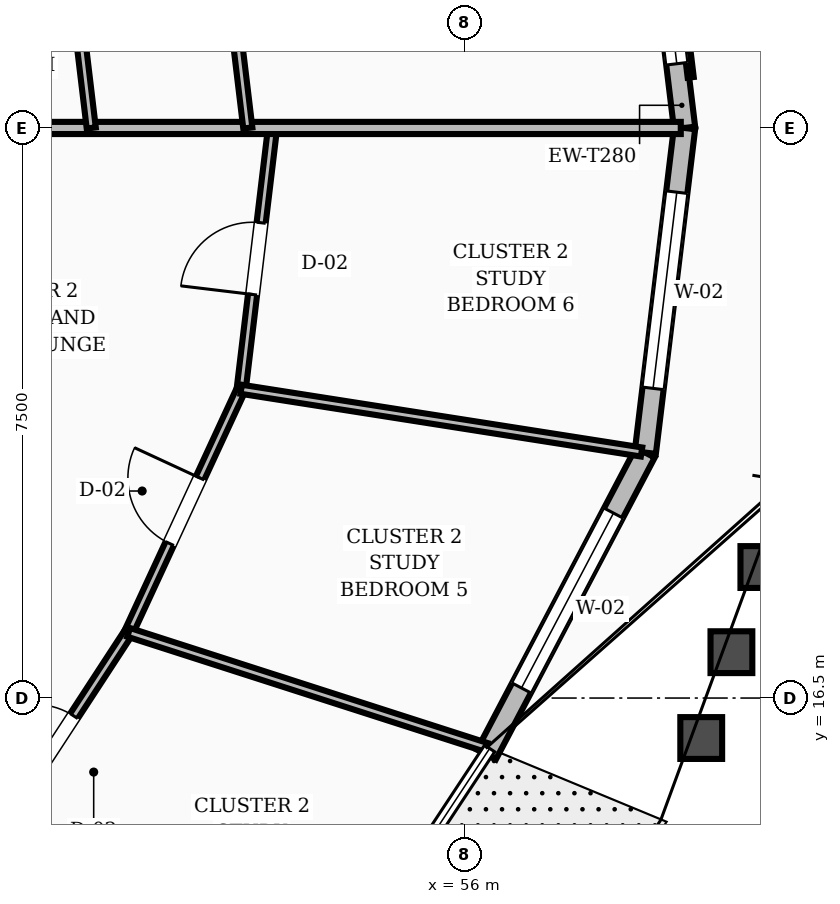
"""IFC4 building model, lengths in metres.
Left out: names, types, materials, properties, quantities, classifications, styles, units other than length and angle.
Written with IfcOpenShell. Run it as: python <this file> out.ifc"""

import sys

from ifc_helpers import new_model, si_unit, direction, frame, frame_2d, origin, place, context, subcontext, project, spatial, rectangle, extrude, element, fill, save


model = new_model("IFC4")
c1 = context("Model", 3, precision=1e-05, world=origin(), true_north=direction((0.0, 1.0)))
c2 = subcontext(c1, "Body", "Model", "MODEL_VIEW")
j1 = project(units=[si_unit("LENGTHUNIT", "METRE"), si_unit("PLANEANGLEUNIT", "RADIAN")], contexts=[c1])
p1 = place(None, origin())
s1 = spatial("IfcSite", under=j1, at=p1, CompositionType="ELEMENT")
p2 = place(p1, origin())
s2 = spatial("IfcBuilding", under=s1, at=p2, CompositionType="ELEMENT")
p3 = place(p2, frame((0.0, 0.0, 66.4)))
s3 = spatial("IfcBuildingStorey", under=s2, at=p3, CompositionType="ELEMENT", Elevation=66.4)
p4 = place(p3, frame((58.892, 24.0, 0.0), z_axis=(0.0, 0.0, 1.0), x_axis=(-0.120143237499, 0.992756567585, 0.0)))
e1 = element("IfcWall", 1, at=p4, inside=s3, PredefinedType="STANDARD", context=c2, shape_type="SweptSolid", body=[
    extrude(rectangle(XDim=4.302, YDim=0.28, at=frame_2d((2.151, 0.0))), origin(), (0.0, 0.0, 1.0), 2.71),
])
p5 = place(p4, frame((0.851, 0.0, 0.8)))
e2 = element("IfcOpeningElement", 2, at=p5, cuts=e1, PredefinedType="OPENING", context=c2, shape_type="SweptSolid", body=[
    extrude(rectangle(XDim=2.6, YDim=1.65, at=frame_2d((1.3, 0.825))), frame((0.0, 0.15, 0.0), z_axis=(0.0, -1.0, 0.0), x_axis=(1.0, 0.0, 0.0)), (0.0, 0.0, 1.0), 0.3),
])
p6 = place(p3, frame((56.284, 15.755, 0.0), z_axis=(0.0, 0.0, 1.0), x_axis=(0.465582838715, 0.88500430524, 0.0)))
e3 = element("IfcWall", 3, at=p6, inside=s3, PredefinedType="STANDARD", context=c2, shape_type="SweptSolid", body=[
    extrude(rectangle(XDim=4.49, YDim=0.28, at=frame_2d((2.245, 0.0))), origin(), (0.0, 0.0, 1.0), 2.71),
])
p7 = place(p6, frame((0.991, 0.0, 0.8)))
e4 = element("IfcOpeningElement", 4, at=p7, cuts=e3, PredefinedType="OPENING", context=c2, shape_type="SweptSolid", body=[
    extrude(rectangle(XDim=2.6, YDim=1.65, at=frame_2d((1.3, 0.825))), frame((0.0, 0.15, 0.0), z_axis=(0.0, -1.0, 0.0), x_axis=(1.0, 0.0, 0.0)), (0.0, 0.0, 1.0), 0.3),
])
p8 = place(p3, frame((58.375, 19.729, 0.0), z_axis=(0.0, 0.0, 1.0), x_axis=(0.120143237499, 0.992756567585, 0.0)))
e5 = element("IfcWall", 5, at=p8, inside=s3, PredefinedType="STANDARD", context=c2, shape_type="SweptSolid", body=[
    extrude(rectangle(XDim=4.302, YDim=0.28, at=frame_2d((2.151, 0.0))), origin(), (0.0, 0.0, 1.0), 2.71),
])
p9 = place(p8, frame((0.851, 0.0, 0.8)))
e6 = element("IfcOpeningElement", 6, at=p9, cuts=e5, PredefinedType="OPENING", context=c2, shape_type="SweptSolid", body=[
    extrude(rectangle(XDim=2.6, YDim=1.65, at=frame_2d((1.3, 0.825))), frame((0.0, 0.15, 0.0), z_axis=(0.0, -1.0, 0.0), x_axis=(1.0, 0.0, 0.0)), (0.0, 0.0, 1.0), 0.3),
])
p10 = place(p3, frame((49.619, 14.366, 0.0), z_axis=(0.0, 0.0, 1.0), x_axis=(0.546856201366, 0.837226549404, 0.0)))
e7 = element("IfcWall", 7, at=p10, inside=s3, PredefinedType="PARTITIONING", context=c2, shape_type="SweptSolid", body=[
    extrude(rectangle(XDim=3.581, YDim=0.12, at=frame_2d((1.791, 0.0))), origin(), (0.0, 0.0, 1.0), 2.71),
])
p11 = place(p10, frame((1.315, 0.0, 0.0)))
e8 = element("IfcOpeningElement", 8, at=p11, cuts=e7, PredefinedType="OPENING", context=c2, shape_type="SweptSolid", body=[
    extrude(rectangle(XDim=0.95, YDim=2.1, at=frame_2d((0.475, 1.05))), frame((0.0, 0.07, 0.0), z_axis=(0.0, -1.0, 0.0), x_axis=(1.0, 0.0, 0.0)), (0.0, 0.0, 1.0), 0.14),
])
p12 = place(p3, frame((51.578, 17.364, 0.0), z_axis=(0.0, 0.0, 1.0), x_axis=(0.420077084971, 0.907488425646, 0.0)))
e9 = element("IfcWall", 9, at=p12, inside=s3, PredefinedType="PARTITIONING", context=c2, shape_type="SweptSolid", body=[
    extrude(rectangle(XDim=3.524, YDim=0.12, at=frame_2d((1.762, 0.0))), origin(), (0.0, 0.0, 1.0), 2.71),
])
p13 = place(p12, frame((1.287, 0.0, 0.0)))
e10 = element("IfcOpeningElement", 10, at=p13, cuts=e9, PredefinedType="OPENING", context=c2, shape_type="SweptSolid", body=[
    extrude(rectangle(XDim=0.95, YDim=2.1, at=frame_2d((0.475, 1.05))), frame((0.0, 0.07, 0.0), z_axis=(0.0, -1.0, 0.0), x_axis=(1.0, 0.0, 0.0)), (0.0, 0.0, 1.0), 0.14),
])
p14 = place(p3, frame((51.578, 17.364, 0.0), z_axis=(0.0, 0.0, 1.0), x_axis=(0.951991009442, -0.306125983773, 0.0)))
e11 = element("IfcWall", 11, at=p14, inside=s3, PredefinedType="PARTITIONING", context=c2, shape_type="SweptSolid", body=[
    extrude(rectangle(XDim=4.939, YDim=0.12, at=frame_2d((2.469, 0.0))), origin(), (0.0, 0.0, 1.0), 2.71),
])
p15 = place(p3, frame((53.058, 20.562, 0.0), z_axis=(0.0, 0.0, 1.0), x_axis=(0.11916468359, 0.992874502737, 0.0)))
e12 = element("IfcWall", 12, at=p15, inside=s3, PredefinedType="PARTITIONING", context=c2, shape_type="SweptSolid", body=[
    extrude(rectangle(XDim=3.462, YDim=0.12, at=frame_2d((1.731, 0.0))), origin(), (0.0, 0.0, 1.0), 2.71),
])
p16 = place(p15, frame((1.256, 0.0, 0.0)))
e13 = element("IfcOpeningElement", 13, at=p16, cuts=e12, PredefinedType="OPENING", context=c2, shape_type="SweptSolid", body=[
    extrude(rectangle(XDim=0.95, YDim=2.1, at=frame_2d((0.475, 1.05))), frame((0.0, 0.07, 0.0), z_axis=(0.0, -1.0, 0.0), x_axis=(1.0, 0.0, 0.0)), (0.0, 0.0, 1.0), 0.14),
])
p17 = place(p3, frame((53.058, 20.562, 0.0), z_axis=(0.0, 0.0, 1.0), x_axis=(0.987942745889, -0.154819672021, 0.0)))
e14 = element("IfcWall", 14, at=p17, inside=s3, PredefinedType="PARTITIONING", context=c2, shape_type="SweptSolid", body=[
    extrude(rectangle(XDim=5.332, YDim=0.12, at=frame_2d((2.666, 0.0))), origin(), (0.0, 0.0, 1.0), 2.71),
])
p18 = place(p3, frame((48.05, 24.0, 0.0), z_axis=(0.0, 0.0, 1.0), x_axis=(1.0, 0.0, 0.0)))
e15 = element("IfcWall", 15, at=p18, inside=s3, PredefinedType="SOLIDWALL", context=c2, shape_type="SweptSolid", body=[
    extrude(rectangle(XDim=10.792, YDim=0.16, at=frame_2d((5.396, 0.0))), origin(), (0.0, 0.0, 1.0), 2.71),
])
p19 = place(p3, frame((51.086, 24.0, 0.0), z_axis=(0.0, 0.0, 1.0), x_axis=(-0.118563134326, 0.99294651577, 0.0)))
e16 = element("IfcWall", 16, at=p19, inside=s3, PredefinedType="PARTITIONING", context=c2, shape_type="SweptSolid", body=[
    extrude(rectangle(XDim=3.093, YDim=0.12, at=frame_2d((1.546, 0.0))), origin(), (0.0, 0.0, 1.0), 2.71),
])
p20 = place(p3, frame((53.146, 24.0, 0.0), z_axis=(0.0, 0.0, 1.0), x_axis=(-0.119066217162, 0.992886315713, 0.0)))
e17 = element("IfcWall", 17, at=p20, inside=s3, PredefinedType="PARTITIONING", context=c2, shape_type="SweptSolid", body=[
    extrude(rectangle(XDim=3.412, YDim=0.12, at=frame_2d((1.706, 0.0))), origin(), (0.0, 0.0, 1.0), 2.71),
])
p21 = place(p20, frame((1.231, 0.0, 0.0)))
e18 = element("IfcOpeningElement", 18, at=p21, cuts=e17, PredefinedType="OPENING", context=c2, shape_type="SweptSolid", body=[
    extrude(rectangle(XDim=0.95, YDim=2.1, at=frame_2d((0.475, 1.05))), frame((0.0, 0.07, 0.0), z_axis=(0.0, -1.0, 0.0), x_axis=(1.0, 0.0, 0.0)), (0.0, 0.0, 1.0), 0.14),
])
p22 = place(p5, origin())
e19 = element("IfcWindow", 19, at=p22, inside=s3, PartitioningType="SINGLE_PANEL", PredefinedType="WINDOW", context=c2, shape_type="SweptSolid", body=[
    extrude(rectangle(XDim=2.6, YDim=1.65, at=frame_2d((1.3, 0.825))), frame((0.0, 0.03, 0.0), z_axis=(0.0, -1.0, 0.0), x_axis=(1.0, 0.0, 0.0)), (0.0, 0.0, 1.0), 0.06),
])
fill(e2, e19)
p23 = place(p7, origin())
e20 = element("IfcWindow", 20, at=p23, inside=s3, PartitioningType="SINGLE_PANEL", PredefinedType="WINDOW", context=c2, shape_type="SweptSolid", body=[
    extrude(rectangle(XDim=2.6, YDim=1.65, at=frame_2d((1.3, 0.825))), frame((0.0, 0.03, 0.0), z_axis=(0.0, -1.0, 0.0), x_axis=(1.0, 0.0, 0.0)), (0.0, 0.0, 1.0), 0.06),
])
fill(e4, e20)
p24 = place(p9, origin())
e21 = element("IfcWindow", 21, at=p24, inside=s3, PartitioningType="SINGLE_PANEL", PredefinedType="WINDOW", context=c2, shape_type="SweptSolid", body=[
    extrude(rectangle(XDim=2.6, YDim=1.65, at=frame_2d((1.3, 0.825))), frame((0.0, 0.03, 0.0), z_axis=(0.0, -1.0, 0.0), x_axis=(1.0, 0.0, 0.0)), (0.0, 0.0, 1.0), 0.06),
])
fill(e6, e21)
p25 = place(p11, origin())
e22 = element("IfcDoor", 22, at=p25, inside=s3, OperationType="SINGLE_SWING_LEFT", PredefinedType="DOOR", context=c2, shape_type="SweptSolid", body=[
    extrude(rectangle(XDim=0.95, YDim=2.1, at=frame_2d((0.475, 1.05))), frame((0.0, 0.025, 0.0), z_axis=(0.0, -1.0, 0.0), x_axis=(1.0, 0.0, 0.0)), (0.0, 0.0, 1.0), 0.05),
])
fill(e8, e22)
p26 = place(p13, origin())
e23 = element("IfcDoor", 23, at=p26, inside=s3, OperationType="SINGLE_SWING_RIGHT", PredefinedType="DOOR", context=c2, shape_type="SweptSolid", body=[
    extrude(rectangle(XDim=0.95, YDim=2.1, at=frame_2d((0.475, 1.05))), frame((0.0, 0.025, 0.0), z_axis=(0.0, -1.0, 0.0), x_axis=(1.0, 0.0, 0.0)), (0.0, 0.0, 1.0), 0.05),
])
fill(e10, e23)
p27 = place(p16, origin())
e24 = element("IfcDoor", 24, at=p27, inside=s3, OperationType="SINGLE_SWING_LEFT", PredefinedType="DOOR", context=c2, shape_type="SweptSolid", body=[
    extrude(rectangle(XDim=0.95, YDim=2.1, at=frame_2d((0.475, 1.05))), frame((0.0, 0.025, 0.0), z_axis=(0.0, -1.0, 0.0), x_axis=(1.0, 0.0, 0.0)), (0.0, 0.0, 1.0), 0.05),
])
fill(e13, e24)
save(model, sys.argv[1])
